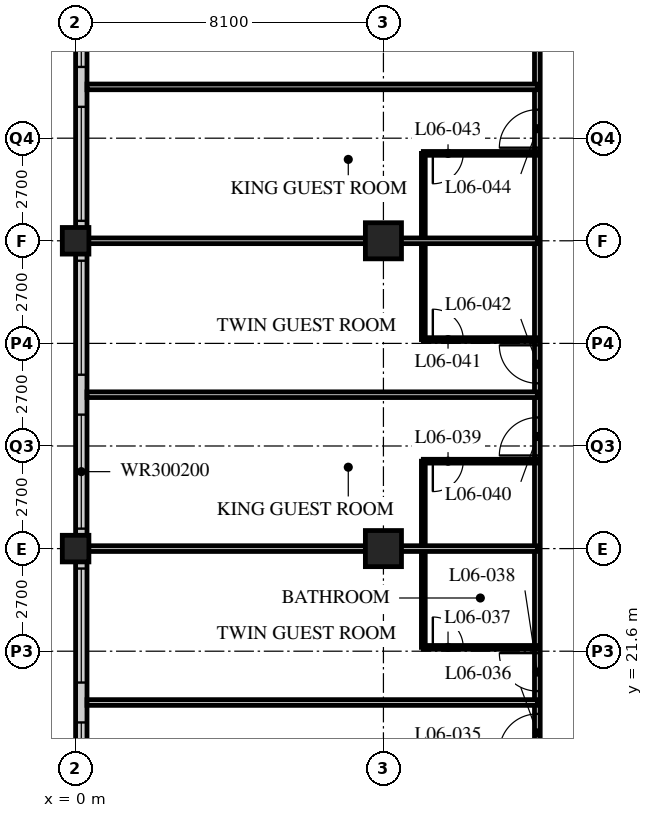
"""IFC4 building model, lengths in metres.
Left out: names, types, materials, properties, quantities, classifications, styles, units other than length and angle.
Written with IfcOpenShell. Run it as: python <this file> out.ifc"""

import sys

from ifc_helpers import new_model, si_unit, direction, frame, frame_2d, origin, origin_2d, place, context, subcontext, project, spatial, rectangle, hollow_rectangle, extrude, element, fill, save


model = new_model("IFC4")
c1 = context("Model", 3, precision=1e-05, world=origin(), true_north=direction((0.0, 1.0)))
c2 = subcontext(c1, "Body", "Model", "MODEL_VIEW")
j1 = project(units=[si_unit("LENGTHUNIT", "METRE"), si_unit("PLANEANGLEUNIT", "RADIAN")], contexts=[c1])
p1 = place(None, origin())
s1 = spatial("IfcSite", under=j1, at=p1, CompositionType="ELEMENT")
p2 = place(p1, origin())
s2 = spatial("IfcBuilding", under=s1, at=p2, CompositionType="ELEMENT")
p3 = place(p2, frame((0.0, 0.0, 33.0)))
s3 = spatial("IfcBuildingStorey", under=s2, at=p3, CompositionType="ELEMENT", Elevation=33.0)
for number, where, z_axis, x_axis in (
    (1, (0.0, 24.3, 0.0), (0.0, 0.0, 1.0), (1.0, 0.0, 0.0)),
    (2, (0.0, 32.4, 0.0), (0.0, 0.0, 1.0), (1.0, 0.0, 0.0)),
):
    element("IfcColumn", number, at=place(p3, frame(where, z_axis=z_axis, x_axis=x_axis)), inside=s3, PredefinedType="COLUMN", context=c2, shape_type="SweptSolid", body=[
        extrude(hollow_rectangle(XDim=0.7, YDim=0.7, WallThickness=0.06, at=origin_2d()), origin(), (0.0, 0.0, 1.0), 3.4),
    ])
for number, where, z_axis, x_axis in (
    (3, (8.1, 24.3, 0.0), (0.0, 0.0, 1.0), (1.0, 0.0, 0.0)),
    (4, (8.1, 32.4, 0.0), (0.0, 0.0, 1.0), (1.0, 0.0, 0.0)),
):
    element("IfcColumn", number, at=place(p3, frame(where, z_axis=z_axis, x_axis=x_axis)), inside=s3, PredefinedType="COLUMN", context=c2, shape_type="SweptSolid", body=[
        extrude(hollow_rectangle(XDim=0.95, YDim=0.95, WallThickness=0.095, at=origin_2d()), origin(), (0.0, 0.0, 1.0), 3.4),
    ])
p4 = place(p3, frame((0.15, 40.2, 0.0), z_axis=(0.0, 0.0, 1.0), x_axis=(0.0, -1.0, 0.0)))
e5 = element("IfcWall", 5, at=p4, inside=s3, PredefinedType="SOLIDWALL", context=c2, shape_type="SweptSolid", body=[
    extrude(rectangle(XDim=32.1, YDim=0.3, at=frame_2d((16.05, 0.0))), origin(), (0.0, 0.0, 1.0), 3.19),
])
p5 = place(p4, frame((0.225, 0.0, 0.9)))
e6 = element("IfcOpeningElement", 6, at=p5, cuts=e5, PredefinedType="OPENING", context=c2, shape_type="SweptSolid", body=[
    extrude(rectangle(XDim=3.0, YDim=2.0, at=frame_2d((1.5, 1.0))), frame((0.0, 0.16, 0.0), z_axis=(0.0, -1.0, 0.0), x_axis=(1.0, 0.0, 0.0)), (0.0, 0.0, 1.0), 0.32),
])
p6 = place(p4, frame((4.275, 0.0, 0.9)))
e7 = element("IfcOpeningElement", 7, at=p6, cuts=e5, PredefinedType="OPENING", context=c2, shape_type="SweptSolid", body=[
    extrude(rectangle(XDim=3.0, YDim=2.0, at=frame_2d((1.5, 1.0))), frame((0.0, 0.16, 0.0), z_axis=(0.0, -1.0, 0.0), x_axis=(1.0, 0.0, 0.0)), (0.0, 0.0, 1.0), 0.32),
])
p7 = place(p4, frame((8.325, 0.0, 0.9)))
e8 = element("IfcOpeningElement", 8, at=p7, cuts=e5, PredefinedType="OPENING", context=c2, shape_type="SweptSolid", body=[
    extrude(rectangle(XDim=3.0, YDim=2.0, at=frame_2d((1.5, 1.0))), frame((0.0, 0.16, 0.0), z_axis=(0.0, -1.0, 0.0), x_axis=(1.0, 0.0, 0.0)), (0.0, 0.0, 1.0), 0.32),
])
p8 = place(p4, frame((12.375, 0.0, 0.9)))
e9 = element("IfcOpeningElement", 9, at=p8, cuts=e5, PredefinedType="OPENING", context=c2, shape_type="SweptSolid", body=[
    extrude(rectangle(XDim=3.0, YDim=2.0, at=frame_2d((1.5, 1.0))), frame((0.0, 0.16, 0.0), z_axis=(0.0, -1.0, 0.0), x_axis=(1.0, 0.0, 0.0)), (0.0, 0.0, 1.0), 0.32),
])
p9 = place(p4, frame((16.425, 0.0, 0.9)))
e10 = element("IfcOpeningElement", 10, at=p9, cuts=e5, PredefinedType="OPENING", context=c2, shape_type="SweptSolid", body=[
    extrude(rectangle(XDim=3.0, YDim=2.0, at=frame_2d((1.5, 1.0))), frame((0.0, 0.16, 0.0), z_axis=(0.0, -1.0, 0.0), x_axis=(1.0, 0.0, 0.0)), (0.0, 0.0, 1.0), 0.32),
])
p10 = place(p4, frame((20.475, 0.0, 0.9)))
e11 = element("IfcOpeningElement", 11, at=p10, cuts=e5, PredefinedType="OPENING", context=c2, shape_type="SweptSolid", body=[
    extrude(rectangle(XDim=3.0, YDim=2.0, at=frame_2d((1.5, 1.0))), frame((0.0, 0.16, 0.0), z_axis=(0.0, -1.0, 0.0), x_axis=(1.0, 0.0, 0.0)), (0.0, 0.0, 1.0), 0.32),
])
p11 = place(p4, frame((24.525, 0.0, 0.9)))
e12 = element("IfcOpeningElement", 12, at=p11, cuts=e5, PredefinedType="OPENING", context=c2, shape_type="SweptSolid", body=[
    extrude(rectangle(XDim=3.0, YDim=2.0, at=frame_2d((1.5, 1.0))), frame((0.0, 0.16, 0.0), z_axis=(0.0, -1.0, 0.0), x_axis=(1.0, 0.0, 0.0)), (0.0, 0.0, 1.0), 0.32),
])
p12 = place(p4, frame((28.575, 0.0, 0.9)))
e13 = element("IfcOpeningElement", 13, at=p12, cuts=e5, PredefinedType="OPENING", context=c2, shape_type="SweptSolid", body=[
    extrude(rectangle(XDim=3.0, YDim=2.0, at=frame_2d((1.5, 1.0))), frame((0.0, 0.16, 0.0), z_axis=(0.0, -1.0, 0.0), x_axis=(1.0, 0.0, 0.0)), (0.0, 0.0, 1.0), 0.32),
])
p13 = place(p3, frame((12.15, 16.2, 0.0), z_axis=(0.0, 0.0, 1.0), x_axis=(0.0, 1.0, 0.0)))
e14 = element("IfcWall", 14, at=p13, inside=s3, PredefinedType="PARTITIONING", context=c2, shape_type="SweptSolid", body=[
    extrude(rectangle(XDim=26.1, YDim=0.15, at=frame_2d((13.05, 0.0))), origin(), (0.0, 0.0, 1.0), 3.19),
])
p14 = place(p13, frame((2.75, 0.0, 0.0)))
e15 = element("IfcOpeningElement", 15, at=p14, cuts=e14, PredefinedType="OPENING", context=c2, shape_type="SweptSolid", body=[
    extrude(rectangle(XDim=1.0, YDim=2.1, at=frame_2d((0.5, 1.05))), frame((0.0, 0.085, 0.0), z_axis=(0.0, -1.0, 0.0), x_axis=(1.0, 0.0, 0.0)), (0.0, 0.0, 1.0), 0.17),
])
p15 = place(p13, frame((4.35, 0.0, 0.0)))
e16 = element("IfcOpeningElement", 16, at=p15, cuts=e14, PredefinedType="OPENING", context=c2, shape_type="SweptSolid", body=[
    extrude(rectangle(XDim=1.0, YDim=2.1, at=frame_2d((0.5, 1.05))), frame((0.0, 0.085, 0.0), z_axis=(0.0, -1.0, 0.0), x_axis=(1.0, 0.0, 0.0)), (0.0, 0.0, 1.0), 0.17),
])
p16 = place(p13, frame((10.55, 0.0, 0.0)))
e17 = element("IfcOpeningElement", 17, at=p16, cuts=e14, PredefinedType="OPENING", context=c2, shape_type="SweptSolid", body=[
    extrude(rectangle(XDim=1.0, YDim=2.1, at=frame_2d((0.5, 1.05))), frame((0.0, 0.085, 0.0), z_axis=(0.0, -1.0, 0.0), x_axis=(1.0, 0.0, 0.0)), (0.0, 0.0, 1.0), 0.17),
])
p17 = place(p13, frame((12.45, 0.0, 0.0)))
e18 = element("IfcOpeningElement", 18, at=p17, cuts=e14, PredefinedType="OPENING", context=c2, shape_type="SweptSolid", body=[
    extrude(rectangle(XDim=1.0, YDim=2.1, at=frame_2d((0.5, 1.05))), frame((0.0, 0.085, 0.0), z_axis=(0.0, -1.0, 0.0), x_axis=(1.0, 0.0, 0.0)), (0.0, 0.0, 1.0), 0.17),
])
p18 = place(p13, frame((18.65, 0.0, 0.0)))
e19 = element("IfcOpeningElement", 19, at=p18, cuts=e14, PredefinedType="OPENING", context=c2, shape_type="SweptSolid", body=[
    extrude(rectangle(XDim=1.0, YDim=2.1, at=frame_2d((0.5, 1.05))), frame((0.0, 0.085, 0.0), z_axis=(0.0, -1.0, 0.0), x_axis=(1.0, 0.0, 0.0)), (0.0, 0.0, 1.0), 0.17),
])
p19 = place(p13, frame((22.65, 0.0, 0.0)))
e20 = element("IfcOpeningElement", 20, at=p19, cuts=e14, PredefinedType="OPENING", context=c2, shape_type="SweptSolid", body=[
    extrude(rectangle(XDim=1.0, YDim=2.1, at=frame_2d((0.5, 1.05))), frame((0.0, 0.085, 0.0), z_axis=(0.0, -1.0, 0.0), x_axis=(1.0, 0.0, 0.0)), (0.0, 0.0, 1.0), 0.17),
])
p20 = place(p3, frame((12.15, 20.25, 0.0), z_axis=(0.0, 0.0, 1.0), x_axis=(-1.0, 0.0, 0.0)))
e21 = element("IfcWall", 21, at=p20, inside=s3, PredefinedType="PARTITIONING", context=c2, shape_type="SweptSolid", body=[
    extrude(rectangle(XDim=11.85, YDim=0.15, at=frame_2d((5.925, 0.0))), origin(), (0.0, 0.0, 1.0), 3.19),
])
p21 = place(p3, frame((9.15, 21.7, 0.0), z_axis=(0.0, 0.0, 1.0), x_axis=(0.0, 1.0, 0.0)))
e22 = element("IfcWall", 22, at=p21, inside=s3, PredefinedType="PARTITIONING", context=c2, shape_type="SweptSolid", body=[
    extrude(rectangle(XDim=4.9, YDim=0.1, at=frame_2d((2.45, 0.0))), origin(), (0.0, 0.0, 1.0), 3.19),
])
p22 = place(p3, frame((12.15, 21.7, 0.0), z_axis=(0.0, 0.0, 1.0), x_axis=(-1.0, 0.0, 0.0)))
e23 = element("IfcWall", 23, at=p22, inside=s3, PredefinedType="PARTITIONING", context=c2, shape_type="SweptSolid", body=[
    extrude(rectangle(XDim=3.0, YDim=0.1, at=frame_2d((1.5, 0.0))), origin(), (0.0, 0.0, 1.0), 3.19),
])
p23 = place(p22, frame((1.95, 0.0, 0.0)))
e24 = element("IfcOpeningElement", 24, at=p23, cuts=e23, PredefinedType="OPENING", context=c2, shape_type="SweptSolid", body=[
    extrude(rectangle(XDim=0.8, YDim=2.1, at=frame_2d((0.4, 1.05))), frame((0.0, 0.06, 0.0), z_axis=(0.0, -1.0, 0.0), x_axis=(1.0, 0.0, 0.0)), (0.0, 0.0, 1.0), 0.12),
])
p24 = place(p3, frame((12.15, 24.3, 0.0), z_axis=(0.0, 0.0, 1.0), x_axis=(-1.0, 0.0, 0.0)))
e25 = element("IfcWall", 25, at=p24, inside=s3, PredefinedType="PARTITIONING", context=c2, shape_type="SweptSolid", body=[
    extrude(rectangle(XDim=11.85, YDim=0.15, at=frame_2d((5.925, 0.0))), origin(), (0.0, 0.0, 1.0), 2.578),
])
p25 = place(p3, frame((12.15, 26.6, 0.0), z_axis=(0.0, 0.0, 1.0), x_axis=(-1.0, 0.0, 0.0)))
e26 = element("IfcWall", 26, at=p25, inside=s3, PredefinedType="PARTITIONING", context=c2, shape_type="SweptSolid", body=[
    extrude(rectangle(XDim=3.0, YDim=0.1, at=frame_2d((1.5, 0.0))), origin(), (0.0, 0.0, 1.0), 3.19),
])
p26 = place(p25, frame((1.95, 0.0, 0.0)))
e27 = element("IfcOpeningElement", 27, at=p26, cuts=e26, PredefinedType="OPENING", context=c2, shape_type="SweptSolid", body=[
    extrude(rectangle(XDim=0.8, YDim=2.1, at=frame_2d((0.4, 1.05))), frame((0.0, 0.06, 0.0), z_axis=(0.0, -1.0, 0.0), x_axis=(1.0, 0.0, 0.0)), (0.0, 0.0, 1.0), 0.12),
])
p27 = place(p3, frame((12.15, 28.35, 0.0), z_axis=(0.0, 0.0, 1.0), x_axis=(-1.0, 0.0, 0.0)))
e28 = element("IfcWall", 28, at=p27, inside=s3, PredefinedType="PARTITIONING", context=c2, shape_type="SweptSolid", body=[
    extrude(rectangle(XDim=11.85, YDim=0.15, at=frame_2d((5.925, 0.0))), origin(), (0.0, 0.0, 1.0), 3.19),
])
p28 = place(p3, frame((9.15, 29.8, 0.0), z_axis=(0.0, 0.0, 1.0), x_axis=(0.0, 1.0, 0.0)))
e29 = element("IfcWall", 29, at=p28, inside=s3, PredefinedType="PARTITIONING", context=c2, shape_type="SweptSolid", body=[
    extrude(rectangle(XDim=4.9, YDim=0.1, at=frame_2d((2.45, 0.0))), origin(), (0.0, 0.0, 1.0), 3.19),
])
p29 = place(p3, frame((12.15, 29.8, 0.0), z_axis=(0.0, 0.0, 1.0), x_axis=(-1.0, 0.0, 0.0)))
e30 = element("IfcWall", 30, at=p29, inside=s3, PredefinedType="PARTITIONING", context=c2, shape_type="SweptSolid", body=[
    extrude(rectangle(XDim=3.0, YDim=0.1, at=frame_2d((1.5, 0.0))), origin(), (0.0, 0.0, 1.0), 3.19),
])
p30 = place(p29, frame((1.95, 0.0, 0.0)))
e31 = element("IfcOpeningElement", 31, at=p30, cuts=e30, PredefinedType="OPENING", context=c2, shape_type="SweptSolid", body=[
    extrude(rectangle(XDim=0.8, YDim=2.1, at=frame_2d((0.4, 1.05))), frame((0.0, 0.06, 0.0), z_axis=(0.0, -1.0, 0.0), x_axis=(1.0, 0.0, 0.0)), (0.0, 0.0, 1.0), 0.12),
])
p31 = place(p3, frame((12.15, 32.4, 0.0), z_axis=(0.0, 0.0, 1.0), x_axis=(-1.0, 0.0, 0.0)))
e32 = element("IfcWall", 32, at=p31, inside=s3, PredefinedType="PARTITIONING", context=c2, shape_type="SweptSolid", body=[
    extrude(rectangle(XDim=11.85, YDim=0.15, at=frame_2d((5.925, 0.0))), origin(), (0.0, 0.0, 1.0), 2.578),
])
p32 = place(p3, frame((12.15, 34.7, 0.0), z_axis=(0.0, 0.0, 1.0), x_axis=(-1.0, 0.0, 0.0)))
e33 = element("IfcWall", 33, at=p32, inside=s3, PredefinedType="PARTITIONING", context=c2, shape_type="SweptSolid", body=[
    extrude(rectangle(XDim=3.0, YDim=0.1, at=frame_2d((1.5, 0.0))), origin(), (0.0, 0.0, 1.0), 3.19),
])
p33 = place(p32, frame((1.95, 0.0, 0.0)))
e34 = element("IfcOpeningElement", 34, at=p33, cuts=e33, PredefinedType="OPENING", context=c2, shape_type="SweptSolid", body=[
    extrude(rectangle(XDim=0.8, YDim=2.1, at=frame_2d((0.4, 1.05))), frame((0.0, 0.06, 0.0), z_axis=(0.0, -1.0, 0.0), x_axis=(1.0, 0.0, 0.0)), (0.0, 0.0, 1.0), 0.12),
])
p34 = place(p3, frame((12.15, 36.45, 0.0), z_axis=(0.0, 0.0, 1.0), x_axis=(-1.0, 0.0, 0.0)))
e35 = element("IfcWall", 35, at=p34, inside=s3, PredefinedType="PARTITIONING", context=c2, shape_type="SweptSolid", body=[
    extrude(rectangle(XDim=11.85, YDim=0.15, at=frame_2d((5.925, 0.0))), origin(), (0.0, 0.0, 1.0), 3.19),
])
p35 = place(p5, origin())
e36 = element("IfcWindow", 36, at=p35, inside=s3, PartitioningType="SINGLE_PANEL", PredefinedType="WINDOW", context=c2, shape_type="SweptSolid", body=[
    extrude(rectangle(XDim=3.0, YDim=2.0, at=frame_2d((1.5, 1.0))), frame((0.0, 0.03, 0.0), z_axis=(0.0, -1.0, 0.0), x_axis=(1.0, 0.0, 0.0)), (0.0, 0.0, 1.0), 0.06),
])
fill(e6, e36)
p36 = place(p6, origin())
e37 = element("IfcWindow", 37, at=p36, inside=s3, PartitioningType="SINGLE_PANEL", PredefinedType="WINDOW", context=c2, shape_type="SweptSolid", body=[
    extrude(rectangle(XDim=3.0, YDim=2.0, at=frame_2d((1.5, 1.0))), frame((0.0, 0.03, 0.0), z_axis=(0.0, -1.0, 0.0), x_axis=(1.0, 0.0, 0.0)), (0.0, 0.0, 1.0), 0.06),
])
fill(e7, e37)
p37 = place(p7, origin())
e38 = element("IfcWindow", 38, at=p37, inside=s3, PartitioningType="SINGLE_PANEL", PredefinedType="WINDOW", context=c2, shape_type="SweptSolid", body=[
    extrude(rectangle(XDim=3.0, YDim=2.0, at=frame_2d((1.5, 1.0))), frame((0.0, 0.03, 0.0), z_axis=(0.0, -1.0, 0.0), x_axis=(1.0, 0.0, 0.0)), (0.0, 0.0, 1.0), 0.06),
])
fill(e8, e38)
p38 = place(p8, origin())
e39 = element("IfcWindow", 39, at=p38, inside=s3, PartitioningType="SINGLE_PANEL", PredefinedType="WINDOW", context=c2, shape_type="SweptSolid", body=[
    extrude(rectangle(XDim=3.0, YDim=2.0, at=frame_2d((1.5, 1.0))), frame((0.0, 0.03, 0.0), z_axis=(0.0, -1.0, 0.0), x_axis=(1.0, 0.0, 0.0)), (0.0, 0.0, 1.0), 0.06),
])
fill(e9, e39)
p39 = place(p9, origin())
e40 = element("IfcWindow", 40, at=p39, inside=s3, PartitioningType="SINGLE_PANEL", PredefinedType="WINDOW", context=c2, shape_type="SweptSolid", body=[
    extrude(rectangle(XDim=3.0, YDim=2.0, at=frame_2d((1.5, 1.0))), frame((0.0, 0.03, 0.0), z_axis=(0.0, -1.0, 0.0), x_axis=(1.0, 0.0, 0.0)), (0.0, 0.0, 1.0), 0.06),
])
fill(e10, e40)
p40 = place(p10, origin())
e41 = element("IfcWindow", 41, at=p40, inside=s3, PartitioningType="SINGLE_PANEL", PredefinedType="WINDOW", context=c2, shape_type="SweptSolid", body=[
    extrude(rectangle(XDim=3.0, YDim=2.0, at=frame_2d((1.5, 1.0))), frame((0.0, 0.03, 0.0), z_axis=(0.0, -1.0, 0.0), x_axis=(1.0, 0.0, 0.0)), (0.0, 0.0, 1.0), 0.06),
])
fill(e11, e41)
p41 = place(p14, origin())
e42 = element("IfcDoor", 42, at=p41, inside=s3, OperationType="SINGLE_SWING_LEFT", PredefinedType="DOOR", context=c2, shape_type="SweptSolid", body=[
    extrude(rectangle(XDim=1.0, YDim=2.1, at=frame_2d((0.5, 1.05))), frame((0.0, 0.025, 0.0), z_axis=(0.0, -1.0, 0.0), x_axis=(1.0, 0.0, 0.0)), (0.0, 0.0, 1.0), 0.05),
])
fill(e15, e42)
p42 = place(p23, origin())
e43 = element("IfcDoor", 43, at=p42, inside=s3, OperationType="SINGLE_SWING_LEFT", PredefinedType="DOOR", context=c2, shape_type="SweptSolid", body=[
    extrude(rectangle(XDim=0.8, YDim=2.1, at=frame_2d((0.4, 1.05))), frame((0.0, 0.025, 0.0), z_axis=(0.0, -1.0, 0.0), x_axis=(1.0, 0.0, 0.0)), (0.0, 0.0, 1.0), 0.05),
])
fill(e24, e43)
p43 = place(p15, origin())
e44 = element("IfcDoor", 44, at=p43, inside=s3, OperationType="SINGLE_SWING_RIGHT", PredefinedType="DOOR", context=c2, shape_type="SweptSolid", body=[
    extrude(rectangle(XDim=1.0, YDim=2.1, at=frame_2d((0.5, 1.05))), frame((0.0, 0.025, 0.0), z_axis=(0.0, -1.0, 0.0), x_axis=(1.0, 0.0, 0.0)), (0.0, 0.0, 1.0), 0.05),
])
fill(e16, e44)
p44 = place(p26, origin())
e45 = element("IfcDoor", 45, at=p44, inside=s3, OperationType="SINGLE_SWING_RIGHT", PredefinedType="DOOR", context=c2, shape_type="SweptSolid", body=[
    extrude(rectangle(XDim=0.8, YDim=2.1, at=frame_2d((0.4, 1.05))), frame((0.0, 0.025, 0.0), z_axis=(0.0, -1.0, 0.0), x_axis=(1.0, 0.0, 0.0)), (0.0, 0.0, 1.0), 0.05),
])
fill(e27, e45)
p45 = place(p16, origin())
e46 = element("IfcDoor", 46, at=p45, inside=s3, OperationType="SINGLE_SWING_LEFT", PredefinedType="DOOR", context=c2, shape_type="SweptSolid", body=[
    extrude(rectangle(XDim=1.0, YDim=2.1, at=frame_2d((0.5, 1.05))), frame((0.0, 0.025, 0.0), z_axis=(0.0, -1.0, 0.0), x_axis=(1.0, 0.0, 0.0)), (0.0, 0.0, 1.0), 0.05),
])
fill(e17, e46)
p46 = place(p30, origin())
e47 = element("IfcDoor", 47, at=p46, inside=s3, OperationType="SINGLE_SWING_LEFT", PredefinedType="DOOR", context=c2, shape_type="SweptSolid", body=[
    extrude(rectangle(XDim=0.8, YDim=2.1, at=frame_2d((0.4, 1.05))), frame((0.0, 0.025, 0.0), z_axis=(0.0, -1.0, 0.0), x_axis=(1.0, 0.0, 0.0)), (0.0, 0.0, 1.0), 0.05),
])
fill(e31, e47)
p47 = place(p17, origin())
e48 = element("IfcDoor", 48, at=p47, inside=s3, OperationType="SINGLE_SWING_RIGHT", PredefinedType="DOOR", context=c2, shape_type="SweptSolid", body=[
    extrude(rectangle(XDim=1.0, YDim=2.1, at=frame_2d((0.5, 1.05))), frame((0.0, 0.025, 0.0), z_axis=(0.0, -1.0, 0.0), x_axis=(1.0, 0.0, 0.0)), (0.0, 0.0, 1.0), 0.05),
])
fill(e18, e48)
p48 = place(p33, origin())
e49 = element("IfcDoor", 49, at=p48, inside=s3, OperationType="SINGLE_SWING_RIGHT", PredefinedType="DOOR", context=c2, shape_type="SweptSolid", body=[
    extrude(rectangle(XDim=0.8, YDim=2.1, at=frame_2d((0.4, 1.05))), frame((0.0, 0.025, 0.0), z_axis=(0.0, -1.0, 0.0), x_axis=(1.0, 0.0, 0.0)), (0.0, 0.0, 1.0), 0.05),
])
fill(e34, e49)
p49 = place(p18, origin())
e50 = element("IfcDoor", 50, at=p49, inside=s3, OperationType="SINGLE_SWING_LEFT", PredefinedType="DOOR", context=c2, shape_type="SweptSolid", body=[
    extrude(rectangle(XDim=1.0, YDim=2.1, at=frame_2d((0.5, 1.05))), frame((0.0, 0.025, 0.0), z_axis=(0.0, -1.0, 0.0), x_axis=(1.0, 0.0, 0.0)), (0.0, 0.0, 1.0), 0.05),
])
fill(e19, e50)
save(model, sys.argv[1])
